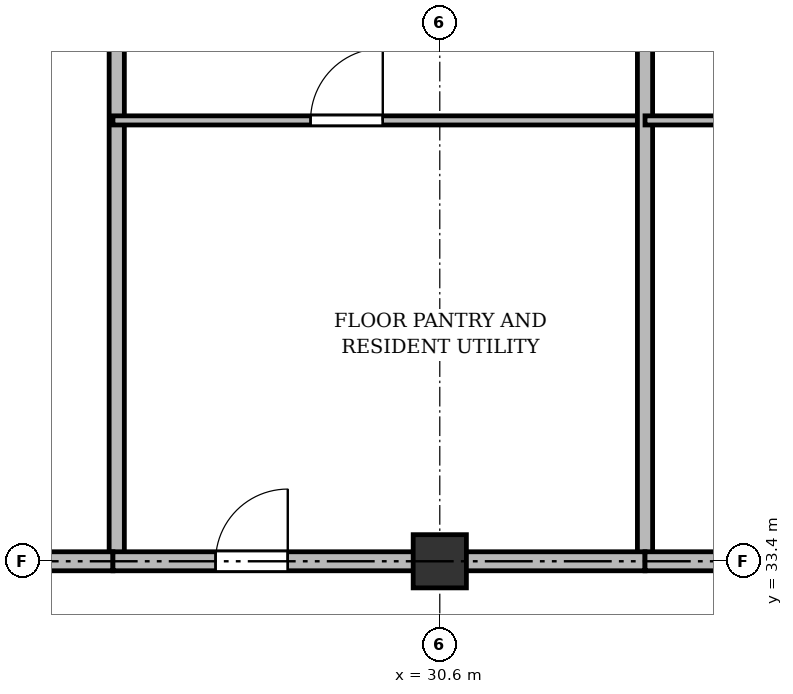
"""IFC4 building model, lengths in metres.
Left out: names, types, materials, properties, quantities, classifications, styles, units other than length and angle.
Written with IfcOpenShell. Run it as: python <this file> out.ifc"""

import sys

from ifc_helpers import new_model, si_unit, direction, frame, frame_2d, origin, origin_2d, place, context, subcontext, project, spatial, rectangle, extrude, source, transform, mapped, element, fill, save


model = new_model("IFC4")
c1 = context("Model", 3, precision=1e-05, world=origin(), true_north=direction((0.0, 1.0)))
c2 = subcontext(c1, "Body", "Model", "MODEL_VIEW")
j1 = project(units=[si_unit("LENGTHUNIT", "METRE"), si_unit("PLANEANGLEUNIT", "RADIAN")], contexts=[c1])
p1 = place(None, origin())
s1 = spatial("IfcSite", under=j1, at=p1, CompositionType="ELEMENT")
p2 = place(p1, origin())
s2 = spatial("IfcBuilding", under=s1, at=p2, CompositionType="ELEMENT")
p3 = place(p2, frame((0.0, 0.0, 222.9)))
s3 = spatial("IfcBuildingStorey", under=s2, at=p3, CompositionType="ELEMENT", Elevation=222.9)
m1 = source(origin(), c2, "Body", "SweptSolid", [
    extrude(rectangle(XDim=0.7, YDim=0.7, at=origin_2d()), origin(), (0.0, 0.0, 1.0), 3.6),
])
p4 = place(p3, frame((30.6, 33.4, 0.0), z_axis=(0.0, 0.0, 1.0), x_axis=(1.0, 0.0, 0.0)))
e1 = element("IfcColumn", 1, at=p4, inside=s3, PredefinedType="COLUMN", context=c2, shape_type="MappedRepresentation", body=[
    mapped(m1, transform((0.0, 0.0, 0.0), x_axis=(1.0, 0.0, 0.0), y_axis=(0.0, 1.0, 0.0), z_axis=(0.0, 0.0, 1.0), scale=1.0)),
])
p5 = place(p3, frame((26.35, 33.4, 0.0), z_axis=(0.0, 0.0, 1.0), x_axis=(0.0, 1.0, 0.0)))
e2 = element("IfcWall", 2, at=p5, inside=s3, PredefinedType="SOLIDWALL", context=c2, shape_type="SweptSolid", body=[
    extrude(rectangle(XDim=11.3, YDim=0.2, at=frame_2d((5.65, 0.0))), origin(), (0.0, 0.0, 1.0), 2.91),
])
p6 = place(p3, frame((19.5, 33.4, 0.0), z_axis=(0.0, 0.0, 1.0), x_axis=(1.0, 0.0, 0.0)))
e3 = element("IfcWall", 3, at=p6, inside=s3, PredefinedType="PARTITIONING", context=c2, shape_type="SweptSolid", body=[
    extrude(rectangle(XDim=6.8, YDim=0.25, at=frame_2d((3.4, 0.0))), origin(), (0.0, 0.0, 1.0), 2.91),
])
p7 = place(p6, frame((0.75, 0.0, 0.0)))
e4 = element("IfcOpeningElement", 4, at=p7, cuts=e3, PredefinedType="OPENING", context=c2, shape_type="SweptSolid", body=[
    extrude(rectangle(XDim=1.6, YDim=2.2, at=frame_2d((0.8, 1.1))), frame((0.0, 0.135, 0.0), z_axis=(0.0, -1.0, 0.0), x_axis=(1.0, 0.0, 0.0)), (0.0, 0.0, 1.0), 0.27),
])
p8 = place(p3, frame((26.3, 39.2, 0.0), z_axis=(0.0, 0.0, 1.0), x_axis=(1.0, 0.0, 0.0)))
e5 = element("IfcWall", 5, at=p8, inside=s3, PredefinedType="PARTITIONING", context=c2, shape_type="SweptSolid", body=[
    extrude(rectangle(XDim=7.0, YDim=0.12, at=frame_2d((3.5, 0.0))), origin(), (0.0, 0.0, 1.0), 2.86),
])
p9 = place(p8, frame((2.6, 0.0, 0.0)))
e6 = element("IfcOpeningElement", 6, at=p9, cuts=e5, PredefinedType="OPENING", context=c2, shape_type="SweptSolid", body=[
    extrude(rectangle(XDim=0.95, YDim=2.15, at=frame_2d((0.475, 1.075))), frame((0.0, 0.07, 0.0), z_axis=(0.0, -1.0, 0.0), x_axis=(1.0, 0.0, 0.0)), (0.0, 0.0, 1.0), 0.14),
])
p10 = place(p3, frame((33.3, 33.4, 0.0), z_axis=(0.0, 0.0, 1.0), x_axis=(0.0, 1.0, 0.0)))
e7 = element("IfcWall", 7, at=p10, inside=s3, PredefinedType="SOLIDWALL", context=c2, shape_type="SweptSolid", body=[
    extrude(rectangle(XDim=11.3, YDim=0.2, at=frame_2d((5.65, 0.0))), origin(), (0.0, 0.0, 1.0), 2.91),
])
p11 = place(p3, frame((33.3, 39.2, 0.0), z_axis=(0.0, 0.0, 1.0), x_axis=(1.0, 0.0, 0.0)))
e8 = element("IfcWall", 8, at=p11, inside=s3, PredefinedType="PARTITIONING", context=c2, shape_type="SweptSolid", body=[
    extrude(rectangle(XDim=6.8, YDim=0.12, at=frame_2d((3.4, 0.0))), origin(), (0.0, 0.0, 1.0), 3.36),
])
p12 = place(p11, frame((2.6, 0.0, 0.0)))
e9 = element("IfcOpeningElement", 9, at=p12, cuts=e8, PredefinedType="OPENING", context=c2, shape_type="SweptSolid", body=[
    extrude(rectangle(XDim=0.95, YDim=2.15, at=frame_2d((0.475, 1.075))), frame((0.0, 0.07, 0.0), z_axis=(0.0, -1.0, 0.0), x_axis=(1.0, 0.0, 0.0)), (0.0, 0.0, 1.0), 0.14),
])
p13 = place(p3, frame((26.3, 33.4, 0.0), z_axis=(0.0, 0.0, 1.0), x_axis=(1.0, 0.0, 0.0)))
e10 = element("IfcWall", 10, at=p13, inside=s3, PredefinedType="PARTITIONING", context=c2, shape_type="SweptSolid", body=[
    extrude(rectangle(XDim=7.0, YDim=0.25, at=frame_2d((3.5, 0.0))), origin(), (0.0, 0.0, 1.0), 2.91),
])
p14 = place(p13, frame((1.35, 0.0, 0.0)))
e11 = element("IfcOpeningElement", 11, at=p14, cuts=e10, PredefinedType="OPENING", context=c2, shape_type="SweptSolid", body=[
    extrude(rectangle(XDim=0.95, YDim=2.15, at=frame_2d((0.475, 1.075))), frame((0.0, 0.135, 0.0), z_axis=(0.0, -1.0, 0.0), x_axis=(1.0, 0.0, 0.0)), (0.0, 0.0, 1.0), 0.27),
])
p15 = place(p3, frame((33.3, 33.4, 0.0), z_axis=(0.0, 0.0, 1.0), x_axis=(1.0, 0.0, 0.0)))
e12 = element("IfcWall", 12, at=p15, inside=s3, PredefinedType="PARTITIONING", context=c2, shape_type="SweptSolid", body=[
    extrude(rectangle(XDim=6.8, YDim=0.25, at=frame_2d((3.4, 0.0))), origin(), (0.0, 0.0, 1.0), 2.91),
])
p16 = place(p15, frame((2.4, 0.0, 0.0)))
e13 = element("IfcOpeningElement", 13, at=p16, cuts=e12, PredefinedType="OPENING", context=c2, shape_type="SweptSolid", body=[
    extrude(rectangle(XDim=1.0, YDim=2.15, at=frame_2d((0.5, 1.075))), frame((0.0, 0.135, 0.0), z_axis=(0.0, -1.0, 0.0), x_axis=(1.0, 0.0, 0.0)), (0.0, 0.0, 1.0), 0.27),
])
m2 = source(origin(), c2, "Body", "SweptSolid", [
    extrude(rectangle(XDim=0.95, YDim=2.15, at=frame_2d((0.475, 1.075))), frame((0.0, 0.025, 0.0), z_axis=(0.0, -1.0, 0.0), x_axis=(1.0, 0.0, 0.0)), (0.0, 0.0, 1.0), 0.05),
])
p17 = place(p9, origin())
e14 = element("IfcDoor", 14, at=p17, inside=s3, OperationType="SINGLE_SWING_RIGHT", PredefinedType="DOOR", context=c2, shape_type="MappedRepresentation", body=[
    mapped(m2, transform((0.0, 0.0, 0.0), x_axis=(1.0, 0.0, 0.0), y_axis=(0.0, 1.0, 0.0), z_axis=(0.0, 0.0, 1.0), scale=1.0)),
])
fill(e6, e14)
p18 = place(p14, origin())
e15 = element("IfcDoor", 15, at=p18, inside=s3, OperationType="SINGLE_SWING_RIGHT", PredefinedType="DOOR", context=c2, shape_type="MappedRepresentation", body=[
    mapped(m2, transform((0.0, 0.0, 0.0), x_axis=(1.0, 0.0, 0.0), y_axis=(0.0, 1.0, 0.0), z_axis=(0.0, 0.0, 1.0), scale=1.0)),
])
fill(e11, e15)
save(model, sys.argv[1])
